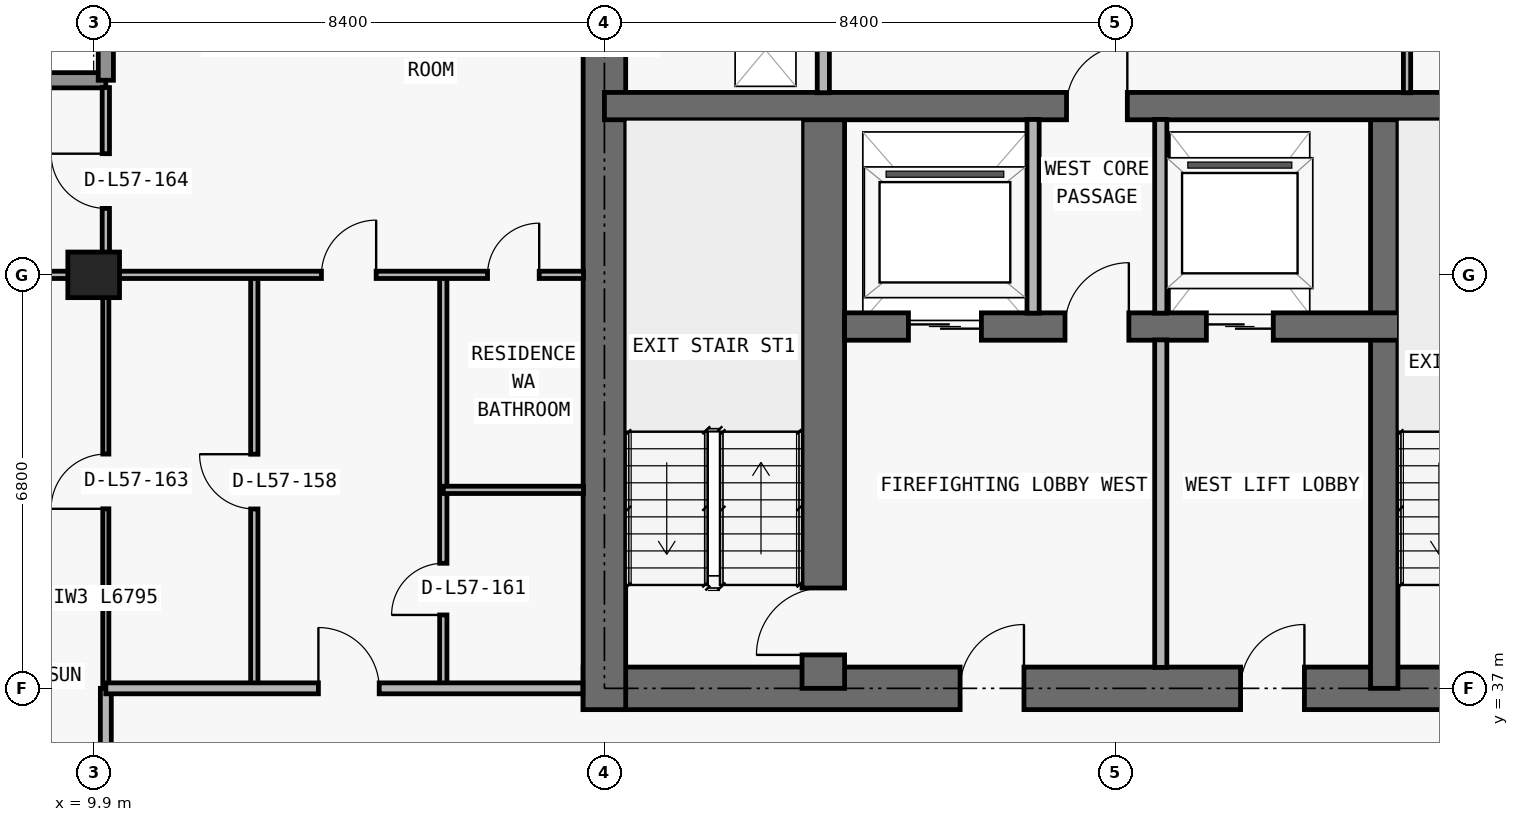
"""IFC4 building model, lengths in metres.
Left out: names, types, materials, properties, quantities, classifications, styles, units other than length and angle.
Written with IfcOpenShell. Run it as: python <this file> out.ifc"""

import sys

from ifc_helpers import new_model, si_unit, direction, frame, frame_2d, origin, origin_2d, place, context, subcontext, project, spatial, rectangle, extrude, element, fill, save


model = new_model("IFC4")
c1 = context("Model", 3, precision=1e-05, world=origin(), true_north=direction((0.0, 1.0)))
c2 = subcontext(c1, "Body", "Model", "MODEL_VIEW")
j1 = project(units=[si_unit("LENGTHUNIT", "METRE"), si_unit("PLANEANGLEUNIT", "RADIAN")], contexts=[c1])
p1 = place(None, origin())
s1 = spatial("IfcSite", under=j1, at=p1, CompositionType="ELEMENT")
p2 = place(p1, origin())
s2 = spatial("IfcBuilding", under=s1, at=p2, CompositionType="ELEMENT")
p3 = place(p2, frame((0.0, 0.0, 204.9)))
s3 = spatial("IfcBuildingStorey", under=s2, at=p3, CompositionType="ELEMENT", Elevation=204.9)
p4 = place(p3, frame((9.9, 43.8, 0.0), z_axis=(0.0, 0.0, 1.0), x_axis=(1.0, 0.0, 0.0)))
e1 = element("IfcColumn", 1, at=p4, inside=s3, PredefinedType="COLUMN", context=c2, shape_type="SweptSolid", body=[
    extrude(rectangle(XDim=0.85, YDim=0.75, at=origin_2d()), origin(), (0.0, 0.0, 1.0), 3.05),
])
p5 = place(p3, frame((17.95, 37.0, 0.0), z_axis=(0.0, 0.0, 1.0), x_axis=(1.0, 0.0, 0.0)))
e2 = element("IfcWall", 2, at=p5, inside=s3, PredefinedType="SHEAR", context=c2, shape_type="SweptSolid", body=[
    extrude(rectangle(XDim=41.9, YDim=0.7, at=frame_2d((20.95, 0.0))), origin(), (0.0, 0.0, 1.0), 3.05),
])
p6 = place(p5, frame((14.35, 0.0, 0.0)))
e3 = element("IfcOpeningElement", 3, at=p6, cuts=e2, PredefinedType="OPENING", context=c2, shape_type="SweptSolid", body=[
    extrude(rectangle(XDim=1.1, YDim=2.15, at=frame_2d((0.55, 1.075))), frame((0.0, 0.36, 0.0), z_axis=(0.0, -1.0, 0.0), x_axis=(1.0, 0.0, 0.0)), (0.0, 0.0, 1.0), 0.72),
])
p7 = place(p5, frame((6.2, 0.0, 0.0)))
e4 = element("IfcOpeningElement", 4, at=p7, cuts=e2, PredefinedType="OPENING", context=c2, shape_type="SweptSolid", body=[
    extrude(rectangle(XDim=1.05, YDim=2.15, at=frame_2d((0.525, 1.075))), frame((0.0, 0.36, 0.0), z_axis=(0.0, -1.0, 0.0), x_axis=(1.0, 0.0, 0.0)), (0.0, 0.0, 1.0), 0.72),
])
p8 = place(p5, frame((34.7, 0.0, 0.0)))
e5 = element("IfcOpeningElement", 5, at=p8, cuts=e2, PredefinedType="OPENING", context=c2, shape_type="SweptSolid", body=[
    extrude(rectangle(XDim=1.05, YDim=2.15, at=frame_2d((0.525, 1.075))), frame((0.0, 0.36, 0.0), z_axis=(0.0, -1.0, 0.0), x_axis=(1.0, 0.0, 0.0)), (0.0, 0.0, 1.0), 0.72),
])
p9 = place(p5, frame((10.812, 0.0, 0.0)))
e6 = element("IfcOpeningElement", 6, at=p9, cuts=e2, PredefinedType="OPENING", context=c2, shape_type="SweptSolid", body=[
    extrude(rectangle(XDim=1.05, YDim=2.15, at=frame_2d((0.525, 1.075))), frame((0.0, 0.36, 0.0), z_axis=(0.0, -1.0, 0.0), x_axis=(1.0, 0.0, 0.0)), (0.0, 0.0, 1.0), 0.72),
])
p10 = place(p5, frame((24.05, 0.0, 0.0)))
e7 = element("IfcOpeningElement", 7, at=p10, cuts=e2, PredefinedType="OPENING", context=c2, shape_type="SweptSolid", body=[
    extrude(rectangle(XDim=1.05, YDim=2.15, at=frame_2d((0.525, 1.075))), frame((0.0, 0.36, 0.0), z_axis=(0.0, -1.0, 0.0), x_axis=(1.0, 0.0, 0.0)), (0.0, 0.0, 1.0), 0.72),
])
p11 = place(p3, frame((18.3, 36.65, 0.0), z_axis=(0.0, 0.0, 1.0), x_axis=(0.0, 1.0, 0.0)))
e8 = element("IfcWall", 8, at=p11, inside=s3, PredefinedType="SHEAR", context=c2, shape_type="SweptSolid", body=[
    extrude(rectangle(XDim=13.95, YDim=0.7, at=frame_2d((6.975, 0.0))), origin(), (0.0, 0.0, 1.0), 3.05),
])
p12 = place(p3, frame((21.9, 37.0, 0.0), z_axis=(0.0, 0.0, 1.0), x_axis=(0.0, 1.0, 0.0)))
e9 = element("IfcWall", 9, at=p12, inside=s3, PredefinedType="SHEAR", context=c2, shape_type="SweptSolid", body=[
    extrude(rectangle(XDim=9.575, YDim=0.7, at=frame_2d((4.788, 0.0))), origin(), (0.0, 0.0, 1.0), 3.05),
])
p13 = place(p12, frame((0.55, 0.0, 0.0)))
e10 = element("IfcOpeningElement", 10, at=p13, cuts=e9, PredefinedType="OPENING", context=c2, shape_type="SweptSolid", body=[
    extrude(rectangle(XDim=1.1, YDim=2.15, at=frame_2d((0.55, 1.075))), frame((0.0, 0.36, 0.0), z_axis=(0.0, -1.0, 0.0), x_axis=(1.0, 0.0, 0.0)), (0.0, 0.0, 1.0), 0.72),
])
p14 = place(p3, frame((31.125, 37.0, 0.0), z_axis=(0.0, 0.0, 1.0), x_axis=(0.0, 1.0, 0.0)))
e11 = element("IfcWall", 11, at=p14, inside=s3, PredefinedType="SHEAR", context=c2, shape_type="SweptSolid", body=[
    extrude(rectangle(XDim=9.575, YDim=0.45, at=frame_2d((4.788, 0.0))), origin(), (0.0, 0.0, 1.0), 3.05),
])
p15 = place(p3, frame((22.25, 42.95, 0.0), z_axis=(0.0, 0.0, 1.0), x_axis=(1.0, 0.0, 0.0)))
e12 = element("IfcWall", 12, at=p15, inside=s3, PredefinedType="SHEAR", context=c2, shape_type="SweptSolid", body=[
    extrude(rectangle(XDim=33.3, YDim=0.45, at=frame_2d((16.65, 0.0))), origin(), (0.0, 0.0, 1.0), 3.05),
])
p16 = place(p15, frame((1.05, 0.0, 0.0)))
e13 = element("IfcOpeningElement", 13, at=p16, cuts=e12, PredefinedType="OPENING", context=c2, shape_type="SweptSolid", body=[
    extrude(rectangle(XDim=1.2, YDim=2.2, at=frame_2d((0.6, 1.1))), frame((0.0, 0.235, 0.0), z_axis=(0.0, -1.0, 0.0), x_axis=(1.0, 0.0, 0.0)), (0.0, 0.0, 1.0), 0.47),
])
p17 = place(p15, frame((31.05, 0.0, 0.0)))
e14 = element("IfcOpeningElement", 14, at=p17, cuts=e12, PredefinedType="OPENING", context=c2, shape_type="SweptSolid", body=[
    extrude(rectangle(XDim=1.2, YDim=2.2, at=frame_2d((0.6, 1.1))), frame((0.0, 0.235, 0.0), z_axis=(0.0, -1.0, 0.0), x_axis=(1.0, 0.0, 0.0)), (0.0, 0.0, 1.0), 0.47),
])
p18 = place(p15, frame((26.45, 0.0, 0.0)))
e15 = element("IfcOpeningElement", 15, at=p18, cuts=e12, PredefinedType="OPENING", context=c2, shape_type="SweptSolid", body=[
    extrude(rectangle(XDim=1.1, YDim=2.2, at=frame_2d((0.55, 1.1))), frame((0.0, 0.235, 0.0), z_axis=(0.0, -1.0, 0.0), x_axis=(1.0, 0.0, 0.0)), (0.0, 0.0, 1.0), 0.47),
])
p19 = place(p15, frame((5.95, 0.0, 0.0)))
e16 = element("IfcOpeningElement", 16, at=p19, cuts=e12, PredefinedType="OPENING", context=c2, shape_type="SweptSolid", body=[
    extrude(rectangle(XDim=1.1, YDim=2.2, at=frame_2d((0.55, 1.1))), frame((0.0, 0.235, 0.0), z_axis=(0.0, -1.0, 0.0), x_axis=(1.0, 0.0, 0.0)), (0.0, 0.0, 1.0), 0.47),
])
p20 = place(p15, frame((3.625, 0.0, 0.0)))
e17 = element("IfcOpeningElement", 17, at=p20, cuts=e12, PredefinedType="OPENING", context=c2, shape_type="SweptSolid", body=[
    extrude(rectangle(XDim=1.05, YDim=2.15, at=frame_2d((0.525, 1.075))), frame((0.0, 0.235, 0.0), z_axis=(0.0, -1.0, 0.0), x_axis=(1.0, 0.0, 0.0)), (0.0, 0.0, 1.0), 0.47),
])
p21 = place(p15, frame((28.675, 0.0, 0.0)))
e18 = element("IfcOpeningElement", 18, at=p21, cuts=e12, PredefinedType="OPENING", context=c2, shape_type="SweptSolid", body=[
    extrude(rectangle(XDim=1.05, YDim=2.15, at=frame_2d((0.525, 1.075))), frame((0.0, 0.235, 0.0), z_axis=(0.0, -1.0, 0.0), x_axis=(1.0, 0.0, 0.0)), (0.0, 0.0, 1.0), 0.47),
])
p22 = place(p15, frame((14.7, 0.0, 0.0)))
e19 = element("IfcOpeningElement", 19, at=p22, cuts=e12, PredefinedType="OPENING", context=c2, shape_type="SweptSolid", body=[
    extrude(rectangle(XDim=1.0, YDim=2.2, at=frame_2d((0.5, 1.1))), frame((0.0, 0.235, 0.0), z_axis=(0.0, -1.0, 0.0), x_axis=(1.0, 0.0, 0.0)), (0.0, 0.0, 1.0), 0.47),
])
p23 = place(p15, frame((21.45, 0.0, 0.0)))
e20 = element("IfcOpeningElement", 20, at=p23, cuts=e12, PredefinedType="OPENING", context=c2, shape_type="SweptSolid", body=[
    extrude(rectangle(XDim=1.0, YDim=2.2, at=frame_2d((0.5, 1.1))), frame((0.0, 0.235, 0.0), z_axis=(0.0, -1.0, 0.0), x_axis=(1.0, 0.0, 0.0)), (0.0, 0.0, 1.0), 0.47),
])
p24 = place(p3, frame((18.3, 46.575, 0.0), z_axis=(0.0, 0.0, 1.0), x_axis=(1.0, 0.0, 0.0)))
e21 = element("IfcWall", 21, at=p24, inside=s3, PredefinedType="SHEAR", context=c2, shape_type="SweptSolid", body=[
    extrude(rectangle(XDim=41.2, YDim=0.45, at=frame_2d((20.6, 0.0))), origin(), (0.0, 0.0, 1.0), 3.05),
])
p25 = place(p24, frame((7.6, 0.0, 0.0)))
e22 = element("IfcOpeningElement", 22, at=p25, cuts=e21, PredefinedType="OPENING", context=c2, shape_type="SweptSolid", body=[
    extrude(rectangle(XDim=1.0, YDim=2.2, at=frame_2d((0.5, 1.1))), frame((0.0, 0.235, 0.0), z_axis=(0.0, -1.0, 0.0), x_axis=(1.0, 0.0, 0.0)), (0.0, 0.0, 1.0), 0.47),
])
p26 = place(p24, frame((32.625, 0.0, 0.0)))
e23 = element("IfcOpeningElement", 23, at=p26, cuts=e21, PredefinedType="OPENING", context=c2, shape_type="SweptSolid", body=[
    extrude(rectangle(XDim=1.05, YDim=2.15, at=frame_2d((0.525, 1.075))), frame((0.0, 0.235, 0.0), z_axis=(0.0, -1.0, 0.0), x_axis=(1.0, 0.0, 0.0)), (0.0, 0.0, 1.0), 0.47),
])
p27 = place(p3, frame((6.25, 47.0, 0.0), z_axis=(0.0, 0.0, 1.0), x_axis=(1.0, 0.0, 0.0)))
e24 = element("IfcWall", 24, at=p27, inside=s3, PredefinedType="ELEMENTEDWALL", context=c2, shape_type="SweptSolid", body=[
    extrude(rectangle(XDim=3.85, YDim=0.25, at=frame_2d((1.925, 0.0))), origin(), (0.0, 0.0, 1.0), 3.05),
])
p28 = place(p3, frame((10.1, 47.0, 0.0), z_axis=(0.0, 0.0, 1.0), x_axis=(0.0, 1.0, 0.0)))
e25 = element("IfcWall", 25, at=p28, inside=s3, PredefinedType="ELEMENTEDWALL", context=c2, shape_type="SweptSolid", body=[
    extrude(rectangle(XDim=3.45, YDim=0.25, at=frame_2d((1.725, 0.0))), origin(), (0.0, 0.0, 1.0), 3.05),
])
p29 = place(p3, frame((10.1, 34.005, 0.0), z_axis=(0.0, 0.0, 1.0), x_axis=(0.0, 1.0, 0.0)))
e26 = element("IfcWall", 26, at=p29, inside=s3, PredefinedType="PARTITIONING", context=c2, shape_type="SweptSolid", body=[
    extrude(rectangle(XDim=2.995, YDim=0.18, at=frame_2d((1.498, 0.0))), origin(), (0.0, 0.0, 1.0), 2.263),
])
p30 = place(p3, frame((10.1, 37.005, 0.0), z_axis=(0.0, 0.0, 1.0), x_axis=(0.0, 1.0, 0.0)))
e27 = element("IfcWall", 27, at=p30, inside=s3, PredefinedType="MOVABLE", context=c2, shape_type="SweptSolid", body=[
    extrude(rectangle(XDim=6.795, YDim=0.1, at=frame_2d((3.397, 0.0))), origin(), (0.0, 0.0, 1.0), 2.263),
])
p31 = place(p30, frame((2.948, 0.0, 0.0)))
e28 = element("IfcOpeningElement", 28, at=p31, cuts=e27, PredefinedType="OPENING", context=c2, shape_type="SweptSolid", body=[
    extrude(rectangle(XDim=0.9, YDim=2.15, at=frame_2d((0.45, 1.075))), frame((0.0, 0.06, 0.0), z_axis=(0.0, -1.0, 0.0), x_axis=(1.0, 0.0, 0.0)), (0.0, 0.0, 1.0), 0.12),
])
p32 = place(p3, frame((10.1, 43.805, 0.0), z_axis=(0.0, 0.0, 1.0), x_axis=(0.0, 1.0, 0.0)))
e29 = element("IfcWall", 29, at=p32, inside=s3, PredefinedType="PARTITIONING", context=c2, shape_type="SweptSolid", body=[
    extrude(rectangle(XDim=3.075, YDim=0.12, at=frame_2d((1.538, 0.0))), origin(), (0.0, 0.0, 1.0), 3.05),
])
p33 = place(p32, frame((1.087, 0.0, 0.0)))
e30 = element("IfcOpeningElement", 30, at=p33, cuts=e29, PredefinedType="OPENING", context=c2, shape_type="SweptSolid", body=[
    extrude(rectangle(XDim=0.9, YDim=2.15, at=frame_2d((0.45, 1.075))), frame((0.0, 0.07, 0.0), z_axis=(0.0, -1.0, 0.0), x_axis=(1.0, 0.0, 0.0)), (0.0, 0.0, 1.0), 0.14),
])
p34 = place(p3, frame((12.542, 37.0, 0.0), z_axis=(0.0, 0.0, 1.0), x_axis=(0.0, 1.0, 0.0)))
e31 = element("IfcWall", 31, at=p34, inside=s3, PredefinedType="PARTITIONING", context=c2, shape_type="SweptSolid", body=[
    extrude(rectangle(XDim=6.8, YDim=0.12, at=frame_2d((3.4, 0.0))), origin(), (0.0, 0.0, 1.0), 3.05),
])
p35 = place(p34, frame((2.95, 0.0, 0.0)))
e32 = element("IfcOpeningElement", 32, at=p35, cuts=e31, PredefinedType="OPENING", context=c2, shape_type="SweptSolid", body=[
    extrude(rectangle(XDim=0.9, YDim=2.15, at=frame_2d((0.45, 1.075))), frame((0.0, 0.07, 0.0), z_axis=(0.0, -1.0, 0.0), x_axis=(1.0, 0.0, 0.0)), (0.0, 0.0, 1.0), 0.14),
])
p36 = place(p3, frame((15.65, 37.0, 0.0), z_axis=(0.0, 0.0, 1.0), x_axis=(0.0, 1.0, 0.0)))
e33 = element("IfcWall", 33, at=p36, inside=s3, PredefinedType="PARTITIONING", context=c2, shape_type="SweptSolid", body=[
    extrude(rectangle(XDim=6.8, YDim=0.12, at=frame_2d((3.4, 0.0))), origin(), (0.0, 0.0, 1.0), 3.05),
])
p37 = place(p36, frame((1.207, 0.0, 0.0)))
e34 = element("IfcOpeningElement", 34, at=p37, cuts=e33, PredefinedType="OPENING", context=c2, shape_type="SweptSolid", body=[
    extrude(rectangle(XDim=0.85, YDim=2.1, at=frame_2d((0.425, 1.05))), frame((0.0, 0.07, 0.0), z_axis=(0.0, -1.0, 0.0), x_axis=(1.0, 0.0, 0.0)), (0.0, 0.0, 1.0), 0.14),
])
p38 = place(p3, frame((21.9, 46.795, 0.0), z_axis=(0.0, 0.0, 1.0), x_axis=(0.0, 1.0, 0.0)))
e35 = element("IfcWall", 35, at=p38, inside=s3, PredefinedType="PARTITIONING", context=c2, shape_type="SweptSolid", body=[
    extrude(rectangle(XDim=3.16, YDim=0.2, at=frame_2d((1.58, 0.0))), origin(), (0.0, 0.0, 1.0), 3.05),
])
p39 = place(p3, frame((25.35, 43.17, 0.0), z_axis=(0.0, 0.0, 1.0), x_axis=(0.0, 1.0, 0.0)))
e36 = element("IfcWall", 36, at=p39, inside=s3, PredefinedType="PARTITIONING", context=c2, shape_type="SweptSolid", body=[
    extrude(rectangle(XDim=3.185, YDim=0.2, at=frame_2d((1.593, 0.0))), origin(), (0.0, 0.0, 1.0), 3.05),
])
p40 = place(p3, frame((27.45, 37.345, 0.0), z_axis=(0.0, 0.0, 1.0), x_axis=(0.0, 1.0, 0.0)))
e37 = element("IfcWall", 37, at=p40, inside=s3, PredefinedType="PARTITIONING", context=c2, shape_type="SweptSolid", body=[
    extrude(rectangle(XDim=5.385, YDim=0.2, at=frame_2d((2.692, 0.0))), origin(), (0.0, 0.0, 1.0), 3.05),
])
p41 = place(p3, frame((27.45, 43.17, 0.0), z_axis=(0.0, 0.0, 1.0), x_axis=(0.0, 1.0, 0.0)))
e38 = element("IfcWall", 38, at=p41, inside=s3, PredefinedType="PARTITIONING", context=c2, shape_type="SweptSolid", body=[
    extrude(rectangle(XDim=3.185, YDim=0.2, at=frame_2d((1.593, 0.0))), origin(), (0.0, 0.0, 1.0), 3.05),
])
p42 = place(p3, frame((31.5, 46.795, 0.0), z_axis=(0.0, 0.0, 1.0), x_axis=(0.0, 1.0, 0.0)))
e39 = element("IfcWall", 39, at=p42, inside=s3, PredefinedType="PARTITIONING", context=c2, shape_type="SweptSolid", body=[
    extrude(rectangle(XDim=3.16, YDim=0.12, at=frame_2d((1.58, 0.0))), origin(), (0.0, 0.0, 1.0), 3.05),
])
p43 = place(p3, frame((10.1, 37.0, 0.0), z_axis=(0.0, 0.0, 1.0), x_axis=(1.0, 0.0, 0.0)))
e40 = element("IfcWall", 40, at=p43, inside=s3, PredefinedType="PARTITIONING", context=c2, shape_type="SweptSolid", body=[
    extrude(rectangle(XDim=7.845, YDim=0.18, at=frame_2d((3.922, 0.0))), origin(), (0.0, 0.0, 1.0), 3.05),
])
p44 = place(p43, frame((3.496, 0.0, 0.0)))
e41 = element("IfcOpeningElement", 41, at=p44, cuts=e40, PredefinedType="OPENING", context=c2, shape_type="SweptSolid", body=[
    extrude(rectangle(XDim=1.0, YDim=2.2, at=frame_2d((0.5, 1.1))), frame((0.0, 0.1, 0.0), z_axis=(0.0, -1.0, 0.0), x_axis=(1.0, 0.0, 0.0)), (0.0, 0.0, 1.0), 0.2),
])
p45 = place(p3, frame((15.65, 40.264, 0.0), z_axis=(0.0, 0.0, 1.0), x_axis=(1.0, 0.0, 0.0)))
e42 = element("IfcWall", 42, at=p45, inside=s3, PredefinedType="PARTITIONING", context=c2, shape_type="SweptSolid", body=[
    extrude(rectangle(XDim=2.305, YDim=0.12, at=frame_2d((1.153, 0.0))), origin(), (0.0, 0.0, 1.0), 3.05),
])
p46 = place(p3, frame((6.395, 43.8, 0.0), z_axis=(0.0, 0.0, 1.0), x_axis=(1.0, 0.0, 0.0)))
e43 = element("IfcWall", 43, at=p46, inside=s3, PredefinedType="PARTITIONING", context=c2, shape_type="SweptSolid", body=[
    extrude(rectangle(XDim=11.56, YDim=0.12, at=frame_2d((5.78, 0.0))), origin(), (0.0, 0.0, 1.0), 2.418),
])
p47 = place(p46, frame((7.251, 0.0, 0.0)))
e44 = element("IfcOpeningElement", 44, at=p47, cuts=e43, PredefinedType="OPENING", context=c2, shape_type="SweptSolid", body=[
    extrude(rectangle(XDim=0.9, YDim=2.15, at=frame_2d((0.45, 1.075))), frame((0.0, 0.07, 0.0), z_axis=(0.0, -1.0, 0.0), x_axis=(1.0, 0.0, 0.0)), (0.0, 0.0, 1.0), 0.14),
])
p48 = place(p46, frame((9.982, 0.0, 0.0)))
e45 = element("IfcOpeningElement", 45, at=p48, cuts=e43, PredefinedType="OPENING", context=c2, shape_type="SweptSolid", body=[
    extrude(rectangle(XDim=0.85, YDim=2.1, at=frame_2d((0.425, 1.05))), frame((0.0, 0.07, 0.0), z_axis=(0.0, -1.0, 0.0), x_axis=(1.0, 0.0, 0.0)), (0.0, 0.0, 1.0), 0.14),
])
p49 = place(p16, origin())
e46 = element("IfcDoor", 46, at=p49, inside=s3, OperationType="DOUBLE_DOOR_SLIDING", PredefinedType="DOOR", context=c2, shape_type="SweptSolid", body=[
    extrude(rectangle(XDim=1.2, YDim=2.2, at=frame_2d((0.6, 1.1))), frame((0.0, 0.025, 0.0), z_axis=(0.0, -1.0, 0.0), x_axis=(1.0, 0.0, 0.0)), (0.0, 0.0, 1.0), 0.05),
])
fill(e13, e46)
p50 = place(p19, origin())
e47 = element("IfcDoor", 47, at=p50, inside=s3, OperationType="DOUBLE_DOOR_SLIDING", PredefinedType="DOOR", context=c2, shape_type="SweptSolid", body=[
    extrude(rectangle(XDim=1.1, YDim=2.2, at=frame_2d((0.55, 1.1))), frame((0.0, 0.025, 0.0), z_axis=(0.0, -1.0, 0.0), x_axis=(1.0, 0.0, 0.0)), (0.0, 0.0, 1.0), 0.05),
])
fill(e16, e47)
p51 = place(p7, origin())
e48 = element("IfcDoor", 48, at=p51, inside=s3, OperationType="SINGLE_SWING_RIGHT", PredefinedType="DOOR", context=c2, shape_type="SweptSolid", body=[
    extrude(rectangle(XDim=1.05, YDim=2.15, at=frame_2d((0.525, 1.075))), frame((0.0, 0.025, 0.0), z_axis=(0.0, -1.0, 0.0), x_axis=(1.0, 0.0, 0.0)), (0.0, 0.0, 1.0), 0.05),
])
fill(e4, e48)
p52 = place(p13, origin())
e49 = element("IfcDoor", 49, at=p52, inside=s3, OperationType="SINGLE_SWING_LEFT", PredefinedType="DOOR", context=c2, shape_type="SweptSolid", body=[
    extrude(rectangle(XDim=1.1, YDim=2.15, at=frame_2d((0.55, 1.075))), frame((0.0, 0.025, 0.0), z_axis=(0.0, -1.0, 0.0), x_axis=(1.0, 0.0, 0.0)), (0.0, 0.0, 1.0), 0.05),
])
fill(e10, e49)
p53 = place(p20, origin())
e50 = element("IfcDoor", 50, at=p53, inside=s3, OperationType="SINGLE_SWING_RIGHT", PredefinedType="DOOR", context=c2, shape_type="SweptSolid", body=[
    extrude(rectangle(XDim=1.05, YDim=2.15, at=frame_2d((0.525, 1.075))), frame((0.0, 0.025, 0.0), z_axis=(0.0, -1.0, 0.0), x_axis=(1.0, 0.0, 0.0)), (0.0, 0.0, 1.0), 0.05),
])
fill(e17, e50)
p54 = place(p9, origin())
e51 = element("IfcDoor", 51, at=p54, inside=s3, OperationType="SINGLE_SWING_RIGHT", PredefinedType="DOOR", context=c2, shape_type="SweptSolid", body=[
    extrude(rectangle(XDim=1.05, YDim=2.15, at=frame_2d((0.525, 1.075))), frame((0.0, 0.025, 0.0), z_axis=(0.0, -1.0, 0.0), x_axis=(1.0, 0.0, 0.0)), (0.0, 0.0, 1.0), 0.05),
])
fill(e6, e51)
p55 = place(p25, origin())
e52 = element("IfcDoor", 52, at=p55, inside=s3, OperationType="SINGLE_SWING_RIGHT", PredefinedType="DOOR", context=c2, shape_type="SweptSolid", body=[
    extrude(rectangle(XDim=1.0, YDim=2.2, at=frame_2d((0.5, 1.1))), frame((0.0, 0.025, 0.0), z_axis=(0.0, -1.0, 0.0), x_axis=(1.0, 0.0, 0.0)), (0.0, 0.0, 1.0), 0.05),
])
fill(e22, e52)
p56 = place(p35, origin())
e53 = element("IfcDoor", 53, at=p56, inside=s3, OperationType="SINGLE_SWING_RIGHT", PredefinedType="DOOR", context=c2, shape_type="SweptSolid", body=[
    extrude(rectangle(XDim=0.9, YDim=2.15, at=frame_2d((0.45, 1.075))), frame((0.0, 0.025, 0.0), z_axis=(0.0, -1.0, 0.0), x_axis=(1.0, 0.0, 0.0)), (0.0, 0.0, 1.0), 0.05),
])
fill(e32, e53)
p57 = place(p44, origin())
e54 = element("IfcDoor", 54, at=p57, inside=s3, OperationType="SINGLE_SWING_LEFT", PredefinedType="DOOR", context=c2, shape_type="SweptSolid", body=[
    extrude(rectangle(XDim=1.0, YDim=2.2, at=frame_2d((0.5, 1.1))), frame((0.0, 0.025, 0.0), z_axis=(0.0, -1.0, 0.0), x_axis=(1.0, 0.0, 0.0)), (0.0, 0.0, 1.0), 0.05),
])
fill(e41, e54)
p58 = place(p47, origin())
e55 = element("IfcDoor", 55, at=p58, inside=s3, OperationType="SINGLE_SWING_RIGHT", PredefinedType="DOOR", context=c2, shape_type="SweptSolid", body=[
    extrude(rectangle(XDim=0.9, YDim=2.15, at=frame_2d((0.45, 1.075))), frame((0.0, 0.025, 0.0), z_axis=(0.0, -1.0, 0.0), x_axis=(1.0, 0.0, 0.0)), (0.0, 0.0, 1.0), 0.05),
])
fill(e44, e55)
p59 = place(p37, origin())
e56 = element("IfcDoor", 56, at=p59, inside=s3, OperationType="SINGLE_SWING_LEFT", PredefinedType="DOOR", context=c2, shape_type="SweptSolid", body=[
    extrude(rectangle(XDim=0.85, YDim=2.1, at=frame_2d((0.425, 1.05))), frame((0.0, 0.025, 0.0), z_axis=(0.0, -1.0, 0.0), x_axis=(1.0, 0.0, 0.0)), (0.0, 0.0, 1.0), 0.05),
])
fill(e34, e56)
p60 = place(p48, origin())
e57 = element("IfcDoor", 57, at=p60, inside=s3, OperationType="SINGLE_SWING_RIGHT", PredefinedType="DOOR", context=c2, shape_type="SweptSolid", body=[
    extrude(rectangle(XDim=0.85, YDim=2.1, at=frame_2d((0.425, 1.05))), frame((0.0, 0.025, 0.0), z_axis=(0.0, -1.0, 0.0), x_axis=(1.0, 0.0, 0.0)), (0.0, 0.0, 1.0), 0.05),
])
fill(e45, e57)
p61 = place(p31, origin())
e58 = element("IfcDoor", 58, at=p61, inside=s3, OperationType="SINGLE_SWING_LEFT", PredefinedType="DOOR", context=c2, shape_type="SweptSolid", body=[
    extrude(rectangle(XDim=0.9, YDim=2.15, at=frame_2d((0.45, 1.075))), frame((0.0, 0.025, 0.0), z_axis=(0.0, -1.0, 0.0), x_axis=(1.0, 0.0, 0.0)), (0.0, 0.0, 1.0), 0.05),
])
fill(e28, e58)
p62 = place(p33, origin())
e59 = element("IfcDoor", 59, at=p62, inside=s3, OperationType="SINGLE_SWING_RIGHT", PredefinedType="DOOR", context=c2, shape_type="SweptSolid", body=[
    extrude(rectangle(XDim=0.9, YDim=2.15, at=frame_2d((0.45, 1.075))), frame((0.0, 0.025, 0.0), z_axis=(0.0, -1.0, 0.0), x_axis=(1.0, 0.0, 0.0)), (0.0, 0.0, 1.0), 0.05),
])
fill(e30, e59)
save(model, sys.argv[1])
